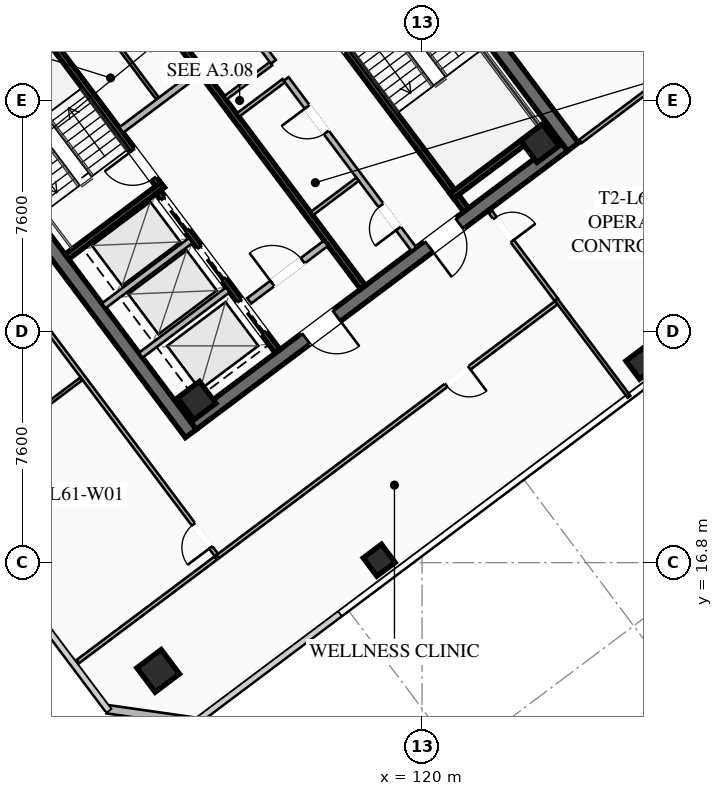
"""IFC4 building model, lengths in metres.
Left out: names, types, materials, properties, quantities, classifications, styles, units other than length and angle.
Written with IfcOpenShell. Run it as: python <this file> out.ifc"""

import sys

from ifc_helpers import new_model, si_unit, direction, frame, frame_2d, origin, origin_2d, place, context, subcontext, project, spatial, rectangle, hollow_rectangle, extrude, element, fill, save


model = new_model("IFC4")
c1 = context("Model", 3, precision=1e-05, world=origin(), true_north=direction((0.0, 1.0)))
c2 = subcontext(c1, "Body", "Model", "MODEL_VIEW")
j1 = project(units=[si_unit("LENGTHUNIT", "METRE"), si_unit("PLANEANGLEUNIT", "RADIAN")], contexts=[c1])
p1 = place(None, origin())
s1 = spatial("IfcSite", under=j1, at=p1, CompositionType="ELEMENT")
p2 = place(p1, origin())
s2 = spatial("IfcBuilding", under=s1, at=p2, CompositionType="ELEMENT")
p3 = place(p2, frame((0.0, 0.0, 225.5)))
s3 = spatial("IfcBuildingStorey", under=s2, at=p3, CompositionType="ELEMENT", Elevation=225.5)
for number, where, z_axis, x_axis in (
    (1, (112.396, 21.047, 0.0), (0.0, 0.0, 1.0), (-0.6, 0.8, 0.0)),
    (2, (115.604, 42.953, 0.0), (0.0, 0.0, 1.0), (0.6, -0.8, 0.0)),
):
    element("IfcWall", number, at=place(p3, frame(where, z_axis=z_axis, x_axis=x_axis)), inside=s3, PredefinedType="SHEAR", context=c2, shape_type="SweptSolid", body=[
        extrude(rectangle(XDim=15.6, YDim=0.45, at=frame_2d((7.8, 0.0))), origin(), (0.0, 0.0, 1.0), 3.55),
    ])
p4 = place(p3, frame((124.649, 30.518, 0.0), z_axis=(0.0, 0.0, 1.0), x_axis=(-0.8, -0.6, 0.0)))
e3 = element("IfcWall", 3, at=p4, inside=s3, PredefinedType="SHEAR", context=c2, shape_type="SweptSolid", body=[
    extrude(rectangle(XDim=15.26, YDim=0.45, at=frame_2d((7.63, 0.0))), origin(), (0.0, 0.0, 1.0), 3.55),
])
p5 = place(p4, frame((9.33, 0.0, 0.0)))
e4 = element("IfcOpeningElement", 4, at=p5, cuts=e3, PredefinedType="OPENING", context=c2, shape_type="SweptSolid", body=[
    extrude(rectangle(XDim=1.25, YDim=2.25, at=frame_2d((0.625, 1.125))), frame((0.0, 0.235, 0.0), z_axis=(0.0, -1.0, 0.0), x_axis=(1.0, 0.0, 0.0)), (0.0, 0.0, 1.0), 0.47),
])
p6 = place(p4, frame((4.28, 0.0, 0.0)))
e5 = element("IfcOpeningElement", 5, at=p6, cuts=e3, PredefinedType="OPENING", context=c2, shape_type="SweptSolid", body=[
    extrude(rectangle(XDim=1.25, YDim=2.25, at=frame_2d((0.625, 1.125))), frame((0.0, 0.235, 0.0), z_axis=(0.0, -1.0, 0.0), x_axis=(1.0, 0.0, 0.0)), (0.0, 0.0, 1.0), 0.47),
])
p7 = place(p3, frame((103.351, 33.482, 0.0), z_axis=(0.0, 0.0, 1.0), x_axis=(0.8, 0.6, 0.0)))
e6 = element("IfcWall", 6, at=p7, inside=s3, PredefinedType="SHEAR", context=c2, shape_type="SweptSolid", body=[
    extrude(rectangle(XDim=15.26, YDim=0.45, at=frame_2d((7.63, 0.0))), origin(), (0.0, 0.0, 1.0), 3.55),
])
p8 = place(p7, frame((4.68, 0.0, 0.0)))
e7 = element("IfcOpeningElement", 7, at=p8, cuts=e6, PredefinedType="OPENING", context=c2, shape_type="SweptSolid", body=[
    extrude(rectangle(XDim=1.25, YDim=2.25, at=frame_2d((0.625, 1.125))), frame((0.0, 0.235, 0.0), z_axis=(0.0, -1.0, 0.0), x_axis=(1.0, 0.0, 0.0)), (0.0, 0.0, 1.0), 0.47),
])
p9 = place(p7, frame((9.73, 0.0, 0.0)))
e8 = element("IfcOpeningElement", 8, at=p9, cuts=e6, PredefinedType="OPENING", context=c2, shape_type="SweptSolid", body=[
    extrude(rectangle(XDim=1.25, YDim=2.25, at=frame_2d((0.625, 1.125))), frame((0.0, 0.235, 0.0), z_axis=(0.0, -1.0, 0.0), x_axis=(1.0, 0.0, 0.0)), (0.0, 0.0, 1.0), 0.47),
])
for number, where, z_axis, x_axis in (
    (9, (112.59, 22.13, 0.0), (0.0, 0.0, 1.0), (0.8, 0.6, 0.0)),
    (10, (123.87, 30.59, 0.0), (0.0, 0.0, 1.0), (0.8, 0.6, 0.0)),
):
    element("IfcColumn", number, at=place(p3, frame(where, z_axis=z_axis, x_axis=x_axis)), inside=s3, PredefinedType="COLUMN", context=c2, shape_type="SweptSolid", body=[
        extrude(hollow_rectangle(XDim=0.9, YDim=0.9, WallThickness=0.04, at=origin_2d()), origin(), (0.0, 0.0, 1.0), 3.37),
    ])
p10 = place(p3, frame((111.32, 13.24, 0.0), z_axis=(0.0, 0.0, 1.0), x_axis=(0.799999996291, 0.600000004945, 0.0)))
e11 = element("IfcColumn", 11, at=p10, inside=s3, PredefinedType="COLUMN", context=c2, shape_type="SweptSolid", body=[
    extrude(hollow_rectangle(XDim=1.0, YDim=1.0, WallThickness=0.04, at=origin_2d()), origin(), (0.0, 0.0, 1.0), 3.37),
])
for number, where, z_axis, x_axis in (
    (12, (118.59, 16.88, 0.0), (0.0, 0.0, 1.0), (0.8, 0.6, 0.0)),
    (13, (127.23, 23.36, 0.0), (0.0, 0.0, 1.0), (0.8, 0.6, 0.0)),
):
    element("IfcColumn", number, at=place(p3, frame(where, z_axis=z_axis, x_axis=x_axis)), inside=s3, PredefinedType="COLUMN", context=c2, shape_type="SweptSolid", body=[
        extrude(hollow_rectangle(XDim=0.75, YDim=0.75, WallThickness=0.032, at=origin_2d()), origin(), (0.0, 0.0, 1.0), 3.37),
    ])
p11 = place(p3, frame((112.58, 11.56, 0.0), z_axis=(0.0, 0.0, 1.0), x_axis=(-0.989954425158, 0.14138683146, 0.0)))
e14 = element("IfcWall", 14, at=p11, inside=s3, PredefinedType="SOLIDWALL", context=c2, shape_type="SweptSolid", body=[
    extrude(rectangle(XDim=2.97, YDim=0.28, at=frame_2d((1.485, 0.0))), origin(), (0.0, 0.0, 1.0), 3.37),
])
p12 = place(p3, frame((111.44, 29.08, 0.0), z_axis=(0.0, 0.0, 1.0), x_axis=(-0.59999041401, 0.800007189403, 0.0)))
e15 = element("IfcWall", 15, at=p12, inside=s3, PredefinedType="SHEAR", context=c2, shape_type="SweptSolid", body=[
    extrude(rectangle(XDim=8.15, YDim=0.2, at=frame_2d((4.075, 0.0))), origin(), (0.0, 0.0, 1.0), 3.37),
])
p13 = place(p12, frame((0.45, 0.0, 0.0)))
e16 = element("IfcOpeningElement", 16, at=p13, cuts=e15, PredefinedType="OPENING", context=c2, shape_type="SweptSolid", body=[
    extrude(rectangle(XDim=1.15, YDim=2.2, at=frame_2d((0.575, 1.1))), frame((0.0, 0.11, 0.0), z_axis=(0.0, -1.0, 0.0), x_axis=(1.0, 0.0, 0.0)), (0.0, 0.0, 1.0), 0.22),
])
p14 = place(p3, frame((108.316, 26.862, 0.0), z_axis=(0.0, 0.0, 1.0), x_axis=(0.800014909178, 0.599980120581, 0.0)))
e17 = element("IfcWall", 17, at=p14, inside=s3, PredefinedType="SHEAR", context=c2, shape_type="SweptSolid", body=[
    extrude(rectangle(XDim=3.93, YDim=0.2, at=frame_2d((1.965, 0.0))), origin(), (0.0, 0.0, 1.0), 3.37),
])
p15 = place(p3, frame((116.56, 34.92, 0.0), z_axis=(0.0, 0.0, 1.0), x_axis=(0.59999041401, -0.800007189403, 0.0)))
e18 = element("IfcWall", 18, at=p15, inside=s3, PredefinedType="SHEAR", context=c2, shape_type="SweptSolid", body=[
    extrude(rectangle(XDim=8.15, YDim=0.2, at=frame_2d((4.075, 0.0))), origin(), (0.0, 0.0, 1.0), 3.37),
])
p16 = place(p15, frame((0.45, 0.0, 0.0)))
e19 = element("IfcOpeningElement", 19, at=p16, cuts=e18, PredefinedType="OPENING", context=c2, shape_type="SweptSolid", body=[
    extrude(rectangle(XDim=1.15, YDim=2.2, at=frame_2d((0.575, 1.1))), frame((0.0, 0.11, 0.0), z_axis=(0.0, -1.0, 0.0), x_axis=(1.0, 0.0, 0.0)), (0.0, 0.0, 1.0), 0.22),
])
p17 = place(p3, frame((120.98, 28.86, 0.0), z_axis=(0.0, 0.0, 1.0), x_axis=(0.800014909178, 0.599980120581, 0.0)))
e20 = element("IfcWall", 20, at=p17, inside=s3, PredefinedType="SHEAR", context=c2, shape_type="SweptSolid", body=[
    extrude(rectangle(XDim=3.93, YDim=0.2, at=frame_2d((1.965, 0.0))), origin(), (0.0, 0.0, 1.0), 3.37),
])
p18 = place(p3, frame((118.058, 25.856, 0.0), z_axis=(0.0, 0.0, 1.0), x_axis=(-0.600002657301, 0.799998007018, 0.0)))
e21 = element("IfcWall", 21, at=p18, inside=s3, PredefinedType="SHEAR", context=c2, shape_type="SweptSolid", body=[
    extrude(rectangle(XDim=14.7, YDim=0.2, at=frame_2d((7.35, 0.0))), origin(), (0.0, 0.0, 1.0), 3.37),
])
p19 = place(p3, frame((110.104, 31.028, 0.0), z_axis=(0.0, 0.0, 1.0), x_axis=(0.800018601094, 0.59997519774, 0.0)))
e22 = element("IfcWall", 22, at=p19, inside=s3, PredefinedType="SOLIDWALL", context=c2, shape_type="SweptSolid", body=[
    extrude(rectangle(XDim=3.15, YDim=0.22, at=frame_2d((1.575, 0.0))), origin(), (0.0, 0.0, 1.0), 2.723),
])
p20 = place(p3, frame((114.316, 25.412, 0.0), z_axis=(0.0, 0.0, 1.0), x_axis=(0.800018601094, 0.59997519774, 0.0)))
e23 = element("IfcWall", 23, at=p20, inside=s3, PredefinedType="SOLIDWALL", context=c2, shape_type="SweptSolid", body=[
    extrude(rectangle(XDim=3.15, YDim=0.22, at=frame_2d((1.575, 0.0))), origin(), (0.0, 0.0, 1.0), 2.723),
])
p21 = place(p20, frame((0.95, 0.0, 0.0)))
e24 = element("IfcOpeningElement", 24, at=p21, cuts=e23, PredefinedType="OPENING", context=c2, shape_type="SweptSolid", body=[
    extrude(rectangle(XDim=1.25, YDim=2.25, at=frame_2d((0.625, 1.125))), frame((0.0, 0.12, 0.0), z_axis=(0.0, -1.0, 0.0), x_axis=(1.0, 0.0, 0.0)), (0.0, 0.0, 1.0), 0.24),
])
p22 = place(p3, frame((115.25, 23.75, 0.0), z_axis=(0.0, 0.0, 1.0), x_axis=(-0.599994036198, 0.800004472816, 0.0)))
e25 = element("IfcWall", 25, at=p22, inside=s3, PredefinedType="SHEAR", context=c2, shape_type="SweptSolid", body=[
    extrude(rectangle(XDim=6.55, YDim=0.2, at=frame_2d((3.275, 0.0))), origin(), (0.0, 0.0, 1.0), 3.37),
])
p23 = place(p22, frame((4.975, 0.0, 0.0)))
e26 = element("IfcOpeningElement", 26, at=p23, cuts=e25, PredefinedType="OPENING", context=c2, shape_type="SweptSolid", body=[
    extrude(rectangle(XDim=1.3, YDim=2.25, at=frame_2d((0.65, 1.125))), frame((0.0, 0.11, 0.0), z_axis=(0.0, -1.0, 0.0), x_axis=(1.0, 0.0, 0.0)), (0.0, 0.0, 1.0), 0.22),
])
p24 = place(p22, frame((2.975, 0.0, 0.0)))
e27 = element("IfcOpeningElement", 27, at=p24, cuts=e25, PredefinedType="OPENING", context=c2, shape_type="SweptSolid", body=[
    extrude(rectangle(XDim=1.3, YDim=2.25, at=frame_2d((0.65, 1.125))), frame((0.0, 0.11, 0.0), z_axis=(0.0, -1.0, 0.0), x_axis=(1.0, 0.0, 0.0)), (0.0, 0.0, 1.0), 0.22),
])
p25 = place(p22, frame((0.775, 0.0, 0.0)))
e28 = element("IfcOpeningElement", 28, at=p25, cuts=e25, PredefinedType="OPENING", context=c2, shape_type="SweptSolid", body=[
    extrude(rectangle(XDim=1.3, YDim=2.25, at=frame_2d((0.65, 1.125))), frame((0.0, 0.11, 0.0), z_axis=(0.0, -1.0, 0.0), x_axis=(1.0, 0.0, 0.0)), (0.0, 0.0, 1.0), 0.22),
])
for number, where, z_axis, x_axis in (
    (29, (110.746, 23.622, 0.0), (0.0, 0.0, 1.0), (0.8, 0.6, 0.0)),
    (30, (109.528, 25.246, 0.0), (0.0, 0.0, 1.0), (0.8, 0.6, 0.0)),
):
    element("IfcWall", number, at=place(p3, frame(where, z_axis=z_axis, x_axis=x_axis)), inside=s3, PredefinedType="SOLIDWALL", context=c2, shape_type="SweptSolid", body=[
        extrude(rectangle(XDim=3.58, YDim=0.2, at=frame_2d((1.79, 0.0))), origin(), (0.0, 0.0, 1.0), 3.37),
    ])
p26 = place(p3, frame((111.296, 32.072, 0.0), z_axis=(0.0, 0.0, 1.0), x_axis=(-0.59995887973, 0.800030838552, 0.0)))
e31 = element("IfcWall", 31, at=p26, inside=s3, PredefinedType="PARTITIONING", context=c2, shape_type="SweptSolid", body=[
    extrude(rectangle(XDim=3.8, YDim=0.11, at=frame_2d((1.9, 0.0))), origin(), (0.0, 0.0, 1.0), 2.723),
])
p27 = place(p3, frame((119.73, 27.11, 0.0), z_axis=(0.0, 0.0, 1.0), x_axis=(-0.600005580459, 0.799995814625, 0.0)))
e32 = element("IfcWall", 32, at=p27, inside=s3, PredefinedType="SOLIDWALL", context=c2, shape_type="SweptSolid", body=[
    extrude(rectangle(XDim=7.0, YDim=0.2, at=frame_2d((3.5, 0.0))), origin(), (0.0, 0.0, 1.0), 2.723),
])
p28 = place(p27, frame((0.85, 0.0, 0.0)))
e33 = element("IfcOpeningElement", 33, at=p28, cuts=e32, PredefinedType="OPENING", context=c2, shape_type="SweptSolid", body=[
    extrude(rectangle(XDim=0.95, YDim=2.05, at=frame_2d((0.475, 1.025))), frame((0.0, 0.11, 0.0), z_axis=(0.0, -1.0, 0.0), x_axis=(1.0, 0.0, 0.0)), (0.0, 0.0, 1.0), 0.22),
])
p29 = place(p27, frame((4.8, 0.0, 0.0)))
e34 = element("IfcOpeningElement", 34, at=p29, cuts=e32, PredefinedType="OPENING", context=c2, shape_type="SweptSolid", body=[
    extrude(rectangle(XDim=1.05, YDim=2.2, at=frame_2d((0.525, 1.1))), frame((0.0, 0.11, 0.0), z_axis=(0.0, -1.0, 0.0), x_axis=(1.0, 0.0, 0.0)), (0.0, 0.0, 1.0), 0.22),
])
for number, where, z_axis, x_axis in (
    (35, (113.946, 31.522, 0.0), (0.0, 0.0, 1.0), (0.8, 0.6, 0.0)),
    (36, (116.376, 28.282, 0.0), (0.0, 0.0, 1.0), (0.8, 0.6, 0.0)),
):
    element("IfcWall", number, at=place(p3, frame(where, z_axis=z_axis, x_axis=x_axis)), inside=s3, PredefinedType="PARTITIONING", context=c2, shape_type="SweptSolid", body=[
        extrude(rectangle(XDim=1.88, YDim=0.135, at=frame_2d((0.94, 0.0))), origin(), (0.0, 0.0, 1.0), 2.723),
    ])
p30 = place(p3, frame((115.11, 33.27, 0.0), z_axis=(0.0, 0.0, 1.0), x_axis=(-0.600011160345, 0.79999162962, 0.0)))
e37 = element("IfcWall", 37, at=p30, inside=s3, PredefinedType="SOLIDWALL", context=c2, shape_type="SweptSolid", body=[
    extrude(rectangle(XDim=7.0, YDim=0.2, at=frame_2d((3.5, 0.0))), origin(), (0.0, 0.0, 1.0), 2.723),
])
p31 = place(p30, frame((0.85, 0.0, 0.0)))
e38 = element("IfcOpeningElement", 38, at=p31, cuts=e37, PredefinedType="OPENING", context=c2, shape_type="SweptSolid", body=[
    extrude(rectangle(XDim=0.95, YDim=2.05, at=frame_2d((0.475, 1.025))), frame((0.0, 0.11, 0.0), z_axis=(0.0, -1.0, 0.0), x_axis=(1.0, 0.0, 0.0)), (0.0, 0.0, 1.0), 0.22),
])
p32 = place(p30, frame((4.85, 0.0, 0.0)))
e39 = element("IfcOpeningElement", 39, at=p32, cuts=e37, PredefinedType="OPENING", context=c2, shape_type="SweptSolid", body=[
    extrude(rectangle(XDim=0.95, YDim=2.05, at=frame_2d((0.475, 1.025))), frame((0.0, 0.11, 0.0), z_axis=(0.0, -1.0, 0.0), x_axis=(1.0, 0.0, 0.0)), (0.0, 0.0, 1.0), 0.22),
])
p33 = place(p3, frame((113.526, 32.082, 0.0), z_axis=(0.0, 0.0, 1.0), x_axis=(0.800046745961, 0.599937666993, 0.0)))
e40 = element("IfcWall", 40, at=p33, inside=s3, PredefinedType="PARTITIONING", context=c2, shape_type="SweptSolid", body=[
    extrude(rectangle(XDim=1.88, YDim=0.135, at=frame_2d((0.94, 0.0))), origin(), (0.0, 0.0, 1.0), 2.723),
])
p34 = place(p3, frame((124.462, 25.384, 0.0), z_axis=(0.0, 0.0, 1.0), x_axis=(-0.799997904343, -0.6000027942, 0.0)))
e41 = element("IfcWall", 41, at=p34, inside=s3, PredefinedType="PARTITIONING", context=c2, shape_type="SweptSolid", body=[
    extrude(rectangle(XDim=13.98, YDim=0.135, at=frame_2d((6.99, 0.0))), origin(), (0.0, 0.0, 1.0), 2.723),
])
p35 = place(p34, frame((3.635, 0.0, 0.0)))
e42 = element("IfcOpeningElement", 42, at=p35, cuts=e41, PredefinedType="OPENING", context=c2, shape_type="SweptSolid", body=[
    extrude(rectangle(XDim=0.95, YDim=2.05, at=frame_2d((0.475, 1.025))), frame((0.0, 0.077, 0.0), z_axis=(0.0, -1.0, 0.0), x_axis=(1.0, 0.0, 0.0)), (0.0, 0.0, 1.0), 0.155),
])
p36 = place(p3, frame((122.248, 28.336, 0.0), z_axis=(0.0, 0.0, 1.0), x_axis=(0.600010820699, -0.799991884361, 0.0)))
e43 = element("IfcWall", 43, at=p36, inside=s3, PredefinedType="PARTITIONING", context=c2, shape_type="SweptSolid", body=[
    extrude(rectangle(XDim=3.61, YDim=0.135, at=frame_2d((1.805, 0.0))), origin(), (0.0, 0.0, 1.0), 2.723),
])
p37 = place(p36, frame((0.25, 0.0, 0.0)))
e44 = element("IfcOpeningElement", 44, at=p37, cuts=e43, PredefinedType="OPENING", context=c2, shape_type="SweptSolid", body=[
    extrude(rectangle(XDim=0.95, YDim=2.05, at=frame_2d((0.475, 1.025))), frame((0.0, 0.077, 0.0), z_axis=(0.0, -1.0, 0.0), x_axis=(1.0, 0.0, 0.0)), (0.0, 0.0, 1.0), 0.155),
])
p38 = place(p3, frame((126.808, 22.256, 0.0), z_axis=(0.0, 0.0, 1.0), x_axis=(-0.600019580308, 0.799985314394, 0.0)))
e45 = element("IfcWall", 45, at=p38, inside=s3, PredefinedType="PARTITIONING", context=c2, shape_type="SweptSolid", body=[
    extrude(rectangle(XDim=3.99, YDim=0.11, at=frame_2d((1.995, 0.0))), origin(), (0.0, 0.0, 1.0), 2.723),
])
p39 = place(p3, frame((125.208, 30.656, 0.0), z_axis=(0.0, 0.0, 1.0), x_axis=(0.79999199534, 0.600010672732, 0.0)))
e46 = element("IfcWall", 46, at=p39, inside=s3, PredefinedType="PARTITIONING", context=c2, shape_type="SweptSolid", body=[
    extrude(rectangle(XDim=7.32, YDim=0.135, at=frame_2d((3.66, 0.0))), origin(), (0.0, 0.0, 1.0), 2.723),
])
p40 = place(p3, frame((113.23, 17.06, 0.0), z_axis=(0.0, 0.0, 1.0), x_axis=(-0.600003772342, 0.79999717073, 0.0)))
e47 = element("IfcWall", 47, at=p40, inside=s3, PredefinedType="PARTITIONING", context=c2, shape_type="SweptSolid", body=[
    extrude(rectangle(XDim=20.71, YDim=0.135, at=frame_2d((10.355, 0.0))), origin(), (0.0, 0.0, 1.0), 2.723),
])
p41 = place(p40, frame((0.3, 0.0, 0.0)))
e48 = element("IfcOpeningElement", 48, at=p41, cuts=e47, PredefinedType="OPENING", context=c2, shape_type="SweptSolid", body=[
    extrude(rectangle(XDim=0.95, YDim=2.05, at=frame_2d((0.475, 1.025))), frame((0.0, 0.077, 0.0), z_axis=(0.0, -1.0, 0.0), x_axis=(1.0, 0.0, 0.0)), (0.0, 0.0, 1.0), 0.155),
])
p42 = place(p40, frame((11.272, 0.0, 0.0)))
e49 = element("IfcOpeningElement", 49, at=p42, cuts=e47, PredefinedType="OPENING", context=c2, shape_type="SweptSolid", body=[
    extrude(rectangle(XDim=0.95, YDim=2.05, at=frame_2d((0.475, 1.025))), frame((0.0, 0.077, 0.0), z_axis=(0.0, -1.0, 0.0), x_axis=(1.0, 0.0, 0.0)), (0.0, 0.0, 1.0), 0.155),
])
p43 = place(p40, frame((19.46, 0.0, 0.0)))
e50 = element("IfcOpeningElement", 50, at=p43, cuts=e47, PredefinedType="OPENING", context=c2, shape_type="SweptSolid", body=[
    extrude(rectangle(XDim=0.95, YDim=2.05, at=frame_2d((0.475, 1.025))), frame((0.0, 0.077, 0.0), z_axis=(0.0, -1.0, 0.0), x_axis=(1.0, 0.0, 0.0)), (0.0, 0.0, 1.0), 0.155),
])
p44 = place(p3, frame((108.678, 13.546, 0.0), z_axis=(0.0, 0.0, 1.0), x_axis=(0.8, 0.6, 0.0)))
e51 = element("IfcWall", 51, at=p44, inside=s3, PredefinedType="PARTITIONING", context=c2, shape_type="SweptSolid", body=[
    extrude(rectangle(XDim=5.67, YDim=0.135, at=frame_2d((2.835, 0.0))), origin(), (0.0, 0.0, 1.0), 2.723),
])
p45 = place(p3, frame((104.256, 19.442, 0.0), z_axis=(0.0, 0.0, 1.0), x_axis=(0.799984498661, 0.600020667896, 0.0)))
e52 = element("IfcWall", 52, at=p45, inside=s3, PredefinedType="PARTITIONING", context=c2, shape_type="SweptSolid", body=[
    extrude(rectangle(XDim=5.67, YDim=0.11, at=frame_2d((2.835, 0.0))), origin(), (0.0, 0.0, 1.0), 2.723),
])
p46 = place(p5, origin())
e53 = element("IfcDoor", 53, at=p46, inside=s3, OperationType="SINGLE_SWING_LEFT", PredefinedType="DOOR", context=c2, shape_type="SweptSolid", body=[
    extrude(rectangle(XDim=1.25, YDim=2.25, at=frame_2d((0.625, 1.125))), frame((0.0, 0.025, 0.0), z_axis=(0.0, -1.0, 0.0), x_axis=(1.0, 0.0, 0.0)), (0.0, 0.0, 1.0), 0.05),
])
fill(e4, e53)
p47 = place(p6, origin())
e54 = element("IfcDoor", 54, at=p47, inside=s3, OperationType="SINGLE_SWING_RIGHT", PredefinedType="DOOR", context=c2, shape_type="SweptSolid", body=[
    extrude(rectangle(XDim=1.25, YDim=2.25, at=frame_2d((0.625, 1.125))), frame((0.0, 0.025, 0.0), z_axis=(0.0, -1.0, 0.0), x_axis=(1.0, 0.0, 0.0)), (0.0, 0.0, 1.0), 0.05),
])
fill(e5, e54)
p48 = place(p13, origin())
e55 = element("IfcDoor", 55, at=p48, inside=s3, OperationType="SINGLE_SWING_RIGHT", PredefinedType="DOOR", context=c2, shape_type="SweptSolid", body=[
    extrude(rectangle(XDim=1.15, YDim=2.2, at=frame_2d((0.575, 1.1))), frame((0.0, 0.025, 0.0), z_axis=(0.0, -1.0, 0.0), x_axis=(1.0, 0.0, 0.0)), (0.0, 0.0, 1.0), 0.05),
])
fill(e16, e55)
p49 = place(p21, origin())
e56 = element("IfcDoor", 56, at=p49, inside=s3, OperationType="SINGLE_SWING_LEFT", PredefinedType="DOOR", context=c2, shape_type="SweptSolid", body=[
    extrude(rectangle(XDim=1.25, YDim=2.25, at=frame_2d((0.625, 1.125))), frame((0.0, 0.025, 0.0), z_axis=(0.0, -1.0, 0.0), x_axis=(1.0, 0.0, 0.0)), (0.0, 0.0, 1.0), 0.05),
])
fill(e24, e56)
p50 = place(p28, origin())
e57 = element("IfcDoor", 57, at=p50, inside=s3, OperationType="SINGLE_SWING_LEFT", PredefinedType="DOOR", context=c2, shape_type="SweptSolid", body=[
    extrude(rectangle(XDim=0.95, YDim=2.05, at=frame_2d((0.475, 1.025))), frame((0.0, 0.025, 0.0), z_axis=(0.0, -1.0, 0.0), x_axis=(1.0, 0.0, 0.0)), (0.0, 0.0, 1.0), 0.05),
])
fill(e33, e57)
p51 = place(p29, origin())
e58 = element("IfcDoor", 58, at=p51, inside=s3, OperationType="SINGLE_SWING_RIGHT", PredefinedType="DOOR", context=c2, shape_type="SweptSolid", body=[
    extrude(rectangle(XDim=1.05, YDim=2.2, at=frame_2d((0.525, 1.1))), frame((0.0, 0.025, 0.0), z_axis=(0.0, -1.0, 0.0), x_axis=(1.0, 0.0, 0.0)), (0.0, 0.0, 1.0), 0.05),
])
fill(e34, e58)
p52 = place(p35, origin())
e59 = element("IfcDoor", 59, at=p52, inside=s3, OperationType="SINGLE_SWING_LEFT", PredefinedType="DOOR", context=c2, shape_type="SweptSolid", body=[
    extrude(rectangle(XDim=0.95, YDim=2.05, at=frame_2d((0.475, 1.025))), frame((0.0, 0.025, 0.0), z_axis=(0.0, -1.0, 0.0), x_axis=(1.0, 0.0, 0.0)), (0.0, 0.0, 1.0), 0.05),
])
fill(e42, e59)
p53 = place(p37, origin())
e60 = element("IfcDoor", 60, at=p53, inside=s3, OperationType="SINGLE_SWING_RIGHT", PredefinedType="DOOR", context=c2, shape_type="SweptSolid", body=[
    extrude(rectangle(XDim=0.95, YDim=2.05, at=frame_2d((0.475, 1.025))), frame((0.0, 0.025, 0.0), z_axis=(0.0, -1.0, 0.0), x_axis=(1.0, 0.0, 0.0)), (0.0, 0.0, 1.0), 0.05),
])
fill(e44, e60)
p54 = place(p41, origin())
e61 = element("IfcDoor", 61, at=p54, inside=s3, OperationType="SINGLE_SWING_LEFT", PredefinedType="DOOR", context=c2, shape_type="SweptSolid", body=[
    extrude(rectangle(XDim=0.95, YDim=2.05, at=frame_2d((0.475, 1.025))), frame((0.0, 0.025, 0.0), z_axis=(0.0, -1.0, 0.0), x_axis=(1.0, 0.0, 0.0)), (0.0, 0.0, 1.0), 0.05),
])
fill(e48, e61)
p55 = place(p23, origin())
e62 = element("IfcDoor", 62, at=p55, inside=s3, OperationType="SLIDING_TO_LEFT", PredefinedType="DOOR", context=c2, shape_type="SweptSolid", body=[
    extrude(rectangle(XDim=1.3, YDim=2.25, at=frame_2d((0.65, 1.125))), frame((0.0, 0.025, 0.0), z_axis=(0.0, -1.0, 0.0), x_axis=(1.0, 0.0, 0.0)), (0.0, 0.0, 1.0), 0.05),
])
fill(e26, e62)
p56 = place(p24, origin())
e63 = element("IfcDoor", 63, at=p56, inside=s3, OperationType="SLIDING_TO_LEFT", PredefinedType="DOOR", context=c2, shape_type="SweptSolid", body=[
    extrude(rectangle(XDim=1.3, YDim=2.25, at=frame_2d((0.65, 1.125))), frame((0.0, 0.025, 0.0), z_axis=(0.0, -1.0, 0.0), x_axis=(1.0, 0.0, 0.0)), (0.0, 0.0, 1.0), 0.05),
])
fill(e27, e63)
p57 = place(p25, origin())
e64 = element("IfcDoor", 64, at=p57, inside=s3, OperationType="SLIDING_TO_LEFT", PredefinedType="DOOR", context=c2, shape_type="SweptSolid", body=[
    extrude(rectangle(XDim=1.3, YDim=2.25, at=frame_2d((0.65, 1.125))), frame((0.0, 0.025, 0.0), z_axis=(0.0, -1.0, 0.0), x_axis=(1.0, 0.0, 0.0)), (0.0, 0.0, 1.0), 0.05),
])
fill(e28, e64)
save(model, sys.argv[1])
